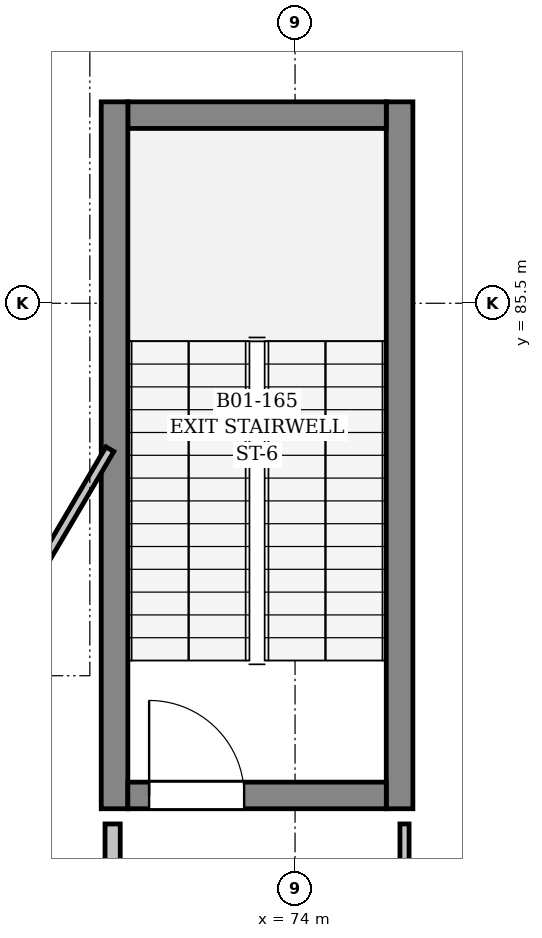
"""IFC4 building model, lengths in metres.
Left out: names, types, materials, properties, quantities, classifications, styles, units other than length and angle.
Written with IfcOpenShell. Run it as: python <this file> out.ifc"""

import sys

from ifc_helpers import new_model, si_unit, direction, frame, frame_2d, origin, place, context, subcontext, project, spatial, rectangle, extrude, element, fill, save


model = new_model("IFC4")
c1 = context("Model", 3, precision=1e-05, world=origin(), true_north=direction((0.0, 1.0)))
c2 = subcontext(c1, "Body", "Model", "MODEL_VIEW")
j1 = project(units=[si_unit("LENGTHUNIT", "METRE"), si_unit("PLANEANGLEUNIT", "RADIAN")], contexts=[c1])
p1 = place(None, origin())
s1 = spatial("IfcSite", under=j1, at=p1, CompositionType="ELEMENT")
p2 = place(p1, origin())
s2 = spatial("IfcBuilding", under=s1, at=p2, CompositionType="ELEMENT")
p3 = place(p2, frame((0.0, 0.0, -5.4)))
s3 = spatial("IfcBuildingStorey", under=s2, at=p3, CompositionType="ELEMENT", Elevation=-5.4)
p4 = place(p3, frame((100.868, 83.378, 0.0), z_axis=(0.0, 0.0, 1.0), x_axis=(-0.86602741842, -0.499996510533, 0.0)))
e1 = element("IfcWall", 1, at=p4, inside=s3, PredefinedType="USERDEFINED", context=c2, shape_type="SweptSolid", body=[
    extrude(rectangle(XDim=33.416, YDim=0.55, at=frame_2d((16.708, 0.0))), origin(), (0.0, 0.0, 1.0), 5.05),
])
p5 = place(p3, frame((75.375, 78.85, 0.0), z_axis=(0.0, 0.0, 1.0), x_axis=(0.0, 1.0, 0.0)))
e2 = element("IfcWall", 2, at=p5, inside=s3, PredefinedType="SHEAR", context=c2, shape_type="SweptSolid", body=[
    extrude(rectangle(XDim=9.3, YDim=0.35, at=frame_2d((4.65, 0.0))), origin(), (0.0, 0.0, 1.0), 5.05),
])
p6 = place(p3, frame((75.2, 87.975, 0.0), z_axis=(0.0, 0.0, 1.0), x_axis=(-1.0, 0.0, 0.0)))
e3 = element("IfcWall", 3, at=p6, inside=s3, PredefinedType="SHEAR", context=c2, shape_type="SweptSolid", body=[
    extrude(rectangle(XDim=3.4, YDim=0.35, at=frame_2d((1.7, 0.0))), origin(), (0.0, 0.0, 1.0), 5.05),
])
p7 = place(p3, frame((71.625, 88.15, 0.0), z_axis=(0.0, 0.0, 1.0), x_axis=(0.0, -1.0, 0.0)))
e4 = element("IfcWall", 4, at=p7, inside=s3, PredefinedType="SHEAR", context=c2, shape_type="SweptSolid", body=[
    extrude(rectangle(XDim=9.3, YDim=0.35, at=frame_2d((4.65, 0.0))), origin(), (0.0, 0.0, 1.0), 5.05),
])
p8 = place(p3, frame((71.8, 79.025, 0.0), z_axis=(0.0, 0.0, 1.0), x_axis=(1.0, 0.0, 0.0)))
e5 = element("IfcWall", 5, at=p8, inside=s3, PredefinedType="SHEAR", context=c2, shape_type="SweptSolid", body=[
    extrude(rectangle(XDim=3.4, YDim=0.35, at=frame_2d((1.7, 0.0))), origin(), (0.0, 0.0, 1.0), 5.05),
])
p9 = place(p8, frame((0.28, 0.0, 0.0)))
e6 = element("IfcOpeningElement", 6, at=p9, cuts=e5, PredefinedType="OPENING", context=c2, shape_type="SweptSolid", body=[
    extrude(rectangle(XDim=1.25, YDim=2.2, at=frame_2d((0.625, 1.1))), frame((0.0, 0.185, 0.0), z_axis=(0.0, -1.0, 0.0), x_axis=(1.0, 0.0, 0.0)), (0.0, 0.0, 1.0), 0.37),
])
p10 = place(p3, frame((71.6, 78.65, 0.0), z_axis=(0.0, 0.0, 1.0), x_axis=(0.0, -1.0, 0.0)))
e7 = element("IfcWall", 7, at=p10, inside=s3, PredefinedType="PARTITIONING", context=c2, shape_type="SweptSolid", body=[
    extrude(rectangle(XDim=3.05, YDim=0.2, at=frame_2d((1.525, 0.0))), origin(), (0.0, 0.0, 1.0), 5.05),
])
p11 = place(p10, frame((0.9, 0.0, 0.0)))
e8 = element("IfcOpeningElement", 8, at=p11, cuts=e7, PredefinedType="OPENING", context=c2, shape_type="SweptSolid", body=[
    extrude(rectangle(XDim=1.25, YDim=2.2, at=frame_2d((0.625, 1.1))), frame((0.0, 0.11, 0.0), z_axis=(0.0, -1.0, 0.0), x_axis=(1.0, 0.0, 0.0)), (0.0, 0.0, 1.0), 0.22),
])
p12 = place(p3, frame((67.34, 76.41, 0.0), z_axis=(0.0, 0.0, 1.0), x_axis=(0.507554651223, 0.861619565714, 0.0)))
e9 = element("IfcWall", 9, at=p12, inside=s3, PredefinedType="PARTITIONING", context=c2, shape_type="SweptSolid", body=[
    extrude(rectangle(XDim=8.322, YDim=0.12, at=frame_2d((4.161, 0.0))), origin(), (0.0, 0.0, 1.0), 4.39),
])
p13 = place(p12, frame((3.377, 0.0, 0.0)))
e10 = element("IfcOpeningElement", 10, at=p13, cuts=e9, PredefinedType="OPENING", context=c2, shape_type="SweptSolid", body=[
    extrude(rectangle(XDim=0.95, YDim=2.2, at=frame_2d((0.475, 1.1))), frame((0.0, 0.07, 0.0), z_axis=(0.0, -1.0, 0.0), x_axis=(1.0, 0.0, 0.0)), (0.0, 0.0, 1.0), 0.14),
])
p14 = place(p3, frame((75.44, 78.65, 0.0), z_axis=(0.0, 0.0, 1.0), x_axis=(0.0, -1.0, 0.0)))
e11 = element("IfcWall", 11, at=p14, inside=s3, PredefinedType="PARTITIONING", context=c2, shape_type="SweptSolid", body=[
    extrude(rectangle(XDim=3.09, YDim=0.12, at=frame_2d((1.545, 0.0))), origin(), (0.0, 0.0, 1.0), 3.84),
])
p15 = place(p14, frame((1.045, 0.0, 0.0)))
e12 = element("IfcOpeningElement", 12, at=p15, cuts=e11, PredefinedType="OPENING", context=c2, shape_type="SweptSolid", body=[
    extrude(rectangle(XDim=1.0, YDim=2.2, at=frame_2d((0.5, 1.1))), frame((0.0, 0.07, 0.0), z_axis=(0.0, -1.0, 0.0), x_axis=(1.0, 0.0, 0.0)), (0.0, 0.0, 1.0), 0.14),
])
p16 = place(p9, origin())
e13 = element("IfcDoor", 13, at=p16, inside=s3, OperationType="SINGLE_SWING_LEFT", PredefinedType="DOOR", context=c2, shape_type="SweptSolid", body=[
    extrude(rectangle(XDim=1.25, YDim=2.2, at=frame_2d((0.625, 1.1))), frame((0.0, 0.025, 0.0), z_axis=(0.0, -1.0, 0.0), x_axis=(1.0, 0.0, 0.0)), (0.0, 0.0, 1.0), 0.05),
])
fill(e6, e13)
save(model, sys.argv[1])
